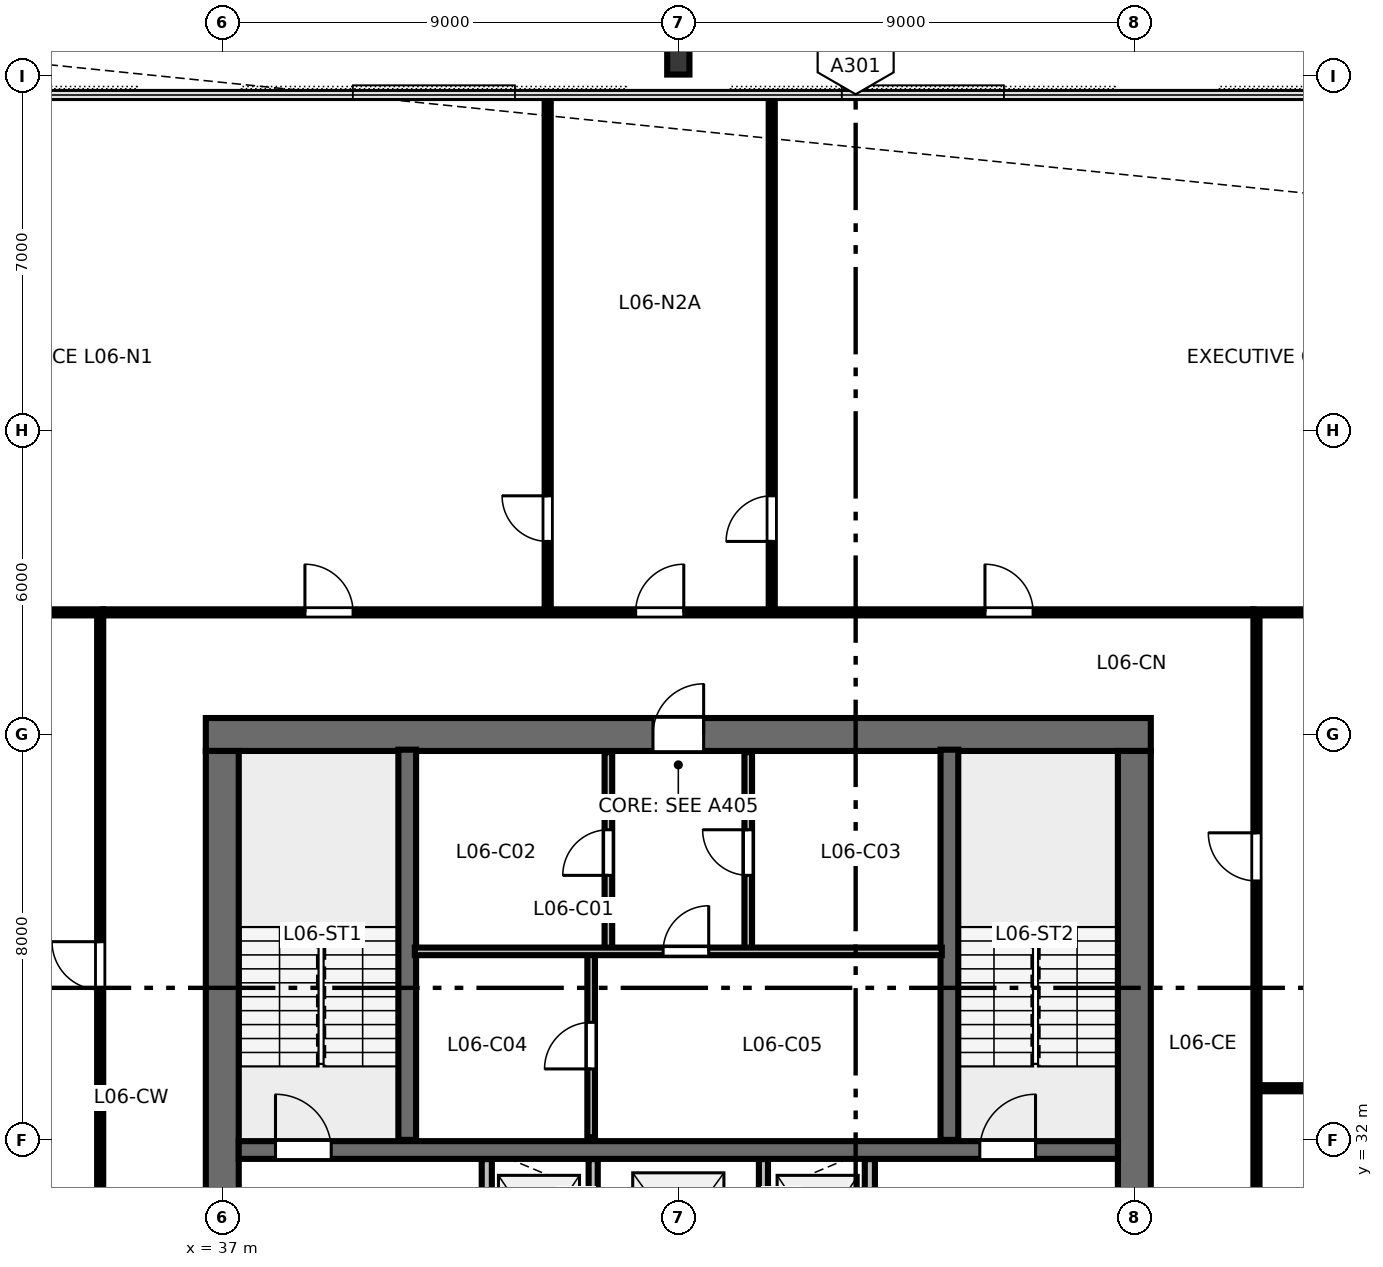
"""IFC4 building model, lengths in metres.
Left out: names, types, materials, properties, quantities, classifications, styles, units other than length and angle.
Written with IfcOpenShell. Run it as: python <this file> out.ifc"""

import sys

from ifc_helpers import new_model, si_unit, direction, frame, frame_2d, origin, origin_2d, place, context, subcontext, project, spatial, rectangle, i_section, extrude, element, fill, save


model = new_model("IFC4")
c1 = context("Model", 3, precision=1e-05, world=origin(), true_north=direction((0.0, 1.0)))
c2 = subcontext(c1, "Body", "Model", "MODEL_VIEW")
j1 = project(units=[si_unit("LENGTHUNIT", "METRE"), si_unit("PLANEANGLEUNIT", "RADIAN")], contexts=[c1])
p1 = place(None, origin())
s1 = spatial("IfcSite", under=j1, at=p1, CompositionType="ELEMENT")
p2 = place(p1, origin())
s2 = spatial("IfcBuilding", under=s1, at=p2, CompositionType="ELEMENT")
p3 = place(p2, frame((0.0, 0.0, 28.0)))
s3 = spatial("IfcBuildingStorey", under=s2, at=p3, CompositionType="ELEMENT", Elevation=28.0)
p4 = place(p3, frame((36.675, 40.0, 0.0), z_axis=(0.0, 0.0, 1.0), x_axis=(1.0, 0.0, 0.0)))
e1 = element("IfcWall", 1, at=p4, inside=s3, PredefinedType="SHEAR", context=c2, shape_type="SweptSolid", body=[
    extrude(rectangle(XDim=18.65, YDim=0.65, at=frame_2d((9.325, 0.0))), origin(), (0.0, 0.0, 1.0), 3.36),
])
p5 = place(p4, frame((8.825, 0.0, 0.0)))
e2 = element("IfcOpeningElement", 2, at=p5, cuts=e1, PredefinedType="OPENING", context=c2, shape_type="SweptSolid", body=[
    extrude(rectangle(XDim=1.0, YDim=2.15, at=frame_2d((0.5, 1.075))), frame((0.0, 0.335, 0.0), z_axis=(0.0, -1.0, 0.0), x_axis=(1.0, 0.0, 0.0)), (0.0, 0.0, 1.0), 0.67),
])
p6 = place(p3, frame((37.0, 24.325, 0.0), z_axis=(0.0, 0.0, 1.0), x_axis=(0.0, 1.0, 0.0)))
e3 = element("IfcWall", 3, at=p6, inside=s3, PredefinedType="SHEAR", context=c2, shape_type="SweptSolid", body=[
    extrude(rectangle(XDim=15.35, YDim=0.65, at=frame_2d((7.675, 0.0))), origin(), (0.0, 0.0, 1.0), 3.36),
])
p7 = place(p6, frame((5.2, 0.0, 0.0)))
e4 = element("IfcOpeningElement", 4, at=p7, cuts=e3, PredefinedType="OPENING", context=c2, shape_type="SweptSolid", body=[
    extrude(rectangle(XDim=1.15, YDim=2.15, at=frame_2d((0.575, 1.075))), frame((0.0, 0.335, 0.0), z_axis=(0.0, -1.0, 0.0), x_axis=(1.0, 0.0, 0.0)), (0.0, 0.0, 1.0), 0.67),
])
p8 = place(p3, frame((55.0, 24.325, 0.0), z_axis=(0.0, 0.0, 1.0), x_axis=(0.0, 1.0, 0.0)))
e5 = element("IfcWall", 5, at=p8, inside=s3, PredefinedType="SHEAR", context=c2, shape_type="SweptSolid", body=[
    extrude(rectangle(XDim=15.35, YDim=0.65, at=frame_2d((7.675, 0.0))), origin(), (0.0, 0.0, 1.0), 3.36),
])
p9 = place(p8, frame((5.2, 0.0, 0.0)))
e6 = element("IfcOpeningElement", 6, at=p9, cuts=e5, PredefinedType="OPENING", context=c2, shape_type="SweptSolid", body=[
    extrude(rectangle(XDim=1.15, YDim=2.15, at=frame_2d((0.575, 1.075))), frame((0.0, 0.335, 0.0), z_axis=(0.0, -1.0, 0.0), x_axis=(1.0, 0.0, 0.0)), (0.0, 0.0, 1.0), 0.67),
])
p10 = place(p3, frame((37.325, 31.8, 0.0), z_axis=(0.0, 0.0, 1.0), x_axis=(1.0, 0.0, 0.0)))
e7 = element("IfcWall", 7, at=p10, inside=s3, PredefinedType="SHEAR", context=c2, shape_type="SweptSolid", body=[
    extrude(rectangle(XDim=17.35, YDim=0.35, at=frame_2d((8.675, 0.0))), origin(), (0.0, 0.0, 1.0), 3.36),
])
p11 = place(p10, frame((0.725, 0.0, 0.0)))
e8 = element("IfcOpeningElement", 8, at=p11, cuts=e7, PredefinedType="OPENING", context=c2, shape_type="SweptSolid", body=[
    extrude(rectangle(XDim=1.1, YDim=2.15, at=frame_2d((0.55, 1.075))), frame((0.0, 0.185, 0.0), z_axis=(0.0, -1.0, 0.0), x_axis=(1.0, 0.0, 0.0)), (0.0, 0.0, 1.0), 0.37),
])
p12 = place(p10, frame((14.625, 0.0, 0.0)))
e9 = element("IfcOpeningElement", 9, at=p12, cuts=e7, PredefinedType="OPENING", context=c2, shape_type="SweptSolid", body=[
    extrude(rectangle(XDim=1.1, YDim=2.15, at=frame_2d((0.55, 1.075))), frame((0.0, 0.185, 0.0), z_axis=(0.0, -1.0, 0.0), x_axis=(1.0, 0.0, 0.0)), (0.0, 0.0, 1.0), 0.37),
])
p13 = place(p3, frame((46.0, 53.28, 0.0), z_axis=(0.0, 0.0, 1.0), x_axis=(1.0, 0.0, 0.0)))
e10 = element("IfcColumn", 10, at=p13, inside=s3, PredefinedType="COLUMN", context=c2, shape_type="SweptSolid", body=[
    extrude(i_section(OverallWidth=0.439, OverallDepth=0.514, WebThickness=0.06, FlangeThickness=0.097, FilletRadius=0.025, at=origin_2d()), origin(), (0.0, 0.0, 1.0), 3.358),
])
for number, where, z_axis, x_axis in (
    (11, (40.65, 32.0, 0.0), (0.0, 0.0, 1.0), (0.0, 1.0, 0.0)),
    (12, (51.35, 32.0, 0.0), (0.0, 0.0, 1.0), (0.0, 1.0, 0.0)),
):
    element("IfcWall", number, at=place(p3, frame(where, z_axis=z_axis, x_axis=x_axis)), inside=s3, PredefinedType="SHEAR", context=c2, shape_type="SweptSolid", body=[
        extrude(rectangle(XDim=7.7, YDim=0.35, at=frame_2d((3.85, 0.0))), origin(), (0.0, 0.0, 1.0), 3.6),
    ])
p14 = place(p3, frame((44.62, 35.72, 0.0), z_axis=(0.0, 0.0, 1.0), x_axis=(0.0, 1.0, 0.0)))
e13 = element("IfcWall", 13, at=p14, inside=s3, PredefinedType="PARTITIONING", context=c2, shape_type="SweptSolid", body=[
    extrude(rectangle(XDim=3.93, YDim=0.15, at=frame_2d((1.965, 0.0))), origin(), (0.0, 0.0, 1.0), 3.36),
])
p15 = place(p14, frame((1.5, 0.0, 0.0)))
e14 = element("IfcOpeningElement", 14, at=p15, cuts=e13, PredefinedType="OPENING", context=c2, shape_type="SweptSolid", body=[
    extrude(rectangle(XDim=0.9, YDim=2.15, at=frame_2d((0.45, 1.075))), frame((0.0, 0.085, 0.0), z_axis=(0.0, -1.0, 0.0), x_axis=(1.0, 0.0, 0.0)), (0.0, 0.0, 1.0), 0.17),
])
p16 = place(p3, frame((47.38, 35.72, 0.0), z_axis=(0.0, 0.0, 1.0), x_axis=(0.0, 1.0, 0.0)))
e15 = element("IfcWall", 15, at=p16, inside=s3, PredefinedType="PARTITIONING", context=c2, shape_type="SweptSolid", body=[
    extrude(rectangle(XDim=3.93, YDim=0.15, at=frame_2d((1.965, 0.0))), origin(), (0.0, 0.0, 1.0), 3.36),
])
p17 = place(p16, frame((1.5, 0.0, 0.0)))
e16 = element("IfcOpeningElement", 16, at=p17, cuts=e15, PredefinedType="OPENING", context=c2, shape_type="SweptSolid", body=[
    extrude(rectangle(XDim=0.9, YDim=2.15, at=frame_2d((0.45, 1.075))), frame((0.0, 0.085, 0.0), z_axis=(0.0, -1.0, 0.0), x_axis=(1.0, 0.0, 0.0)), (0.0, 0.0, 1.0), 0.17),
])
p18 = place(p3, frame((44.28, 32.05, 0.0), z_axis=(0.0, 0.0, 1.0), x_axis=(0.0, 1.0, 0.0)))
e17 = element("IfcWall", 17, at=p18, inside=s3, PredefinedType="PARTITIONING", context=c2, shape_type="SweptSolid", body=[
    extrude(rectangle(XDim=3.67, YDim=0.15, at=frame_2d((1.835, 0.0))), origin(), (0.0, 0.0, 1.0), 3.36),
])
p19 = place(p18, frame((1.35, 0.0, 0.0)))
e18 = element("IfcOpeningElement", 18, at=p19, cuts=e17, PredefinedType="OPENING", context=c2, shape_type="SweptSolid", body=[
    extrude(rectangle(XDim=0.92, YDim=2.15, at=frame_2d((0.46, 1.075))), frame((0.0, 0.085, 0.0), z_axis=(0.0, -1.0, 0.0), x_axis=(1.0, 0.0, 0.0)), (0.0, 0.0, 1.0), 0.17),
])
p20 = place(p3, frame((40.8, 35.72, 0.0), z_axis=(0.0, 0.0, 1.0), x_axis=(1.0, 0.0, 0.0)))
e19 = element("IfcWall", 19, at=p20, inside=s3, PredefinedType="PARTITIONING", context=c2, shape_type="SweptSolid", body=[
    extrude(rectangle(XDim=10.4, YDim=0.15, at=frame_2d((5.2, 0.0))), origin(), (0.0, 0.0, 1.0), 3.36),
])
p21 = place(p20, frame((4.9, 0.0, 0.0)))
e20 = element("IfcOpeningElement", 20, at=p21, cuts=e19, PredefinedType="OPENING", context=c2, shape_type="SweptSolid", body=[
    extrude(rectangle(XDim=0.9, YDim=2.15, at=frame_2d((0.45, 1.075))), frame((0.0, 0.085, 0.0), z_axis=(0.0, -1.0, 0.0), x_axis=(1.0, 0.0, 0.0)), (0.0, 0.0, 1.0), 0.17),
])
p22 = place(p3, frame((42.22, 28.58, 0.0), z_axis=(0.0, 0.0, 1.0), x_axis=(0.0, 1.0, 0.0)))
e21 = element("IfcWall", 21, at=p22, inside=s3, PredefinedType="PARTITIONING", context=c2, shape_type="SweptSolid", body=[
    extrude(rectangle(XDim=3.04, YDim=0.2, at=frame_2d((1.52, 0.0))), origin(), (0.0, 0.0, 1.0), 3.36),
])
p23 = place(p22, frame((0.95, 0.0, 0.0)))
e22 = element("IfcOpeningElement", 22, at=p23, cuts=e21, PredefinedType="OPENING", context=c2, shape_type="SweptSolid", body=[
    extrude(rectangle(XDim=1.05, YDim=2.15, at=frame_2d((0.525, 1.075))), frame((0.0, 0.11, 0.0), z_axis=(0.0, -1.0, 0.0), x_axis=(1.0, 0.0, 0.0)), (0.0, 0.0, 1.0), 0.22),
])
p24 = place(p3, frame((49.78, 28.58, 0.0), z_axis=(0.0, 0.0, 1.0), x_axis=(0.0, 1.0, 0.0)))
e23 = element("IfcWall", 23, at=p24, inside=s3, PredefinedType="PARTITIONING", context=c2, shape_type="SweptSolid", body=[
    extrude(rectangle(XDim=3.04, YDim=0.2, at=frame_2d((1.52, 0.0))), origin(), (0.0, 0.0, 1.0), 3.36),
])
p25 = place(p24, frame((0.95, 0.0, 0.0)))
e24 = element("IfcOpeningElement", 24, at=p25, cuts=e23, PredefinedType="OPENING", context=c2, shape_type="SweptSolid", body=[
    extrude(rectangle(XDim=1.05, YDim=2.15, at=frame_2d((0.525, 1.075))), frame((0.0, 0.11, 0.0), z_axis=(0.0, -1.0, 0.0), x_axis=(1.0, 0.0, 0.0)), (0.0, 0.0, 1.0), 0.22),
])
for number, where, z_axis, x_axis in (
    (25, (44.32, 28.58, 0.0), (0.0, 0.0, 1.0), (0.0, 1.0, 0.0)),
    (26, (47.68, 28.58, 0.0), (0.0, 0.0, 1.0), (0.0, 1.0, 0.0)),
):
    element("IfcWall", number, at=place(p3, frame(where, z_axis=z_axis, x_axis=x_axis)), inside=s3, PredefinedType="PARTITIONING", context=c2, shape_type="SweptSolid", body=[
        extrude(rectangle(XDim=3.04, YDim=0.18, at=frame_2d((1.52, 0.0))), origin(), (0.0, 0.0, 1.0), 3.36),
    ])
p26 = place(p3, frame((43.422, 42.41, 0.0), z_axis=(0.0, 0.0, 1.0), x_axis=(0.0, 1.0, 0.0)))
e27 = element("IfcWall", 27, at=p26, inside=s3, PredefinedType="PARTITIONING", context=c2, shape_type="SweptSolid", body=[
    extrude(rectangle(XDim=10.21, YDim=0.12, at=frame_2d((5.105, 0.0))), origin(), (0.0, 0.0, 1.0), 2.64),
])
p27 = place(p26, frame((1.4, 0.0, 0.0)))
e28 = element("IfcOpeningElement", 28, at=p27, cuts=e27, PredefinedType="OPENING", context=c2, shape_type="SweptSolid", body=[
    extrude(rectangle(XDim=0.9, YDim=2.15, at=frame_2d((0.45, 1.075))), frame((0.0, 0.07, 0.0), z_axis=(0.0, -1.0, 0.0), x_axis=(1.0, 0.0, 0.0)), (0.0, 0.0, 1.0), 0.14),
])
p28 = place(p3, frame((47.844, 42.41, 0.0), z_axis=(0.0, 0.0, 1.0), x_axis=(0.0, 1.0, 0.0)))
e29 = element("IfcWall", 29, at=p28, inside=s3, PredefinedType="PARTITIONING", context=c2, shape_type="SweptSolid", body=[
    extrude(rectangle(XDim=10.21, YDim=0.12, at=frame_2d((5.105, 0.0))), origin(), (0.0, 0.0, 1.0), 2.64),
])
p29 = place(p28, frame((1.4, 0.0, 0.0)))
e30 = element("IfcOpeningElement", 30, at=p29, cuts=e29, PredefinedType="OPENING", context=c2, shape_type="SweptSolid", body=[
    extrude(rectangle(XDim=0.9, YDim=2.15, at=frame_2d((0.45, 1.075))), frame((0.0, 0.07, 0.0), z_axis=(0.0, -1.0, 0.0), x_axis=(1.0, 0.0, 0.0)), (0.0, 0.0, 1.0), 0.14),
])
p30 = place(p3, frame((34.65, 42.41, 0.0), z_axis=(0.0, 0.0, 1.0), x_axis=(1.0, 0.0, 0.0)))
e31 = element("IfcWall", 31, at=p30, inside=s3, PredefinedType="PARTITIONING", context=c2, shape_type="SweptSolid", body=[
    extrude(rectangle(XDim=22.7, YDim=0.12, at=frame_2d((11.35, 0.0))), origin(), (0.0, 0.0, 1.0), 2.64),
])
p31 = place(p30, frame((3.981, 0.0, 0.0)))
e32 = element("IfcOpeningElement", 32, at=p31, cuts=e31, PredefinedType="OPENING", context=c2, shape_type="SweptSolid", body=[
    extrude(rectangle(XDim=0.95, YDim=2.15, at=frame_2d((0.475, 1.075))), frame((0.0, 0.07, 0.0), z_axis=(0.0, -1.0, 0.0), x_axis=(1.0, 0.0, 0.0)), (0.0, 0.0, 1.0), 0.14),
])
p32 = place(p30, frame((10.508, 0.0, 0.0)))
e33 = element("IfcOpeningElement", 33, at=p32, cuts=e31, PredefinedType="OPENING", context=c2, shape_type="SweptSolid", body=[
    extrude(rectangle(XDim=0.95, YDim=2.15, at=frame_2d((0.475, 1.075))), frame((0.0, 0.07, 0.0), z_axis=(0.0, -1.0, 0.0), x_axis=(1.0, 0.0, 0.0)), (0.0, 0.0, 1.0), 0.14),
])
p33 = place(p30, frame((17.402, 0.0, 0.0)))
e34 = element("IfcOpeningElement", 34, at=p33, cuts=e31, PredefinedType="OPENING", context=c2, shape_type="SweptSolid", body=[
    extrude(rectangle(XDim=0.95, YDim=2.15, at=frame_2d((0.475, 1.075))), frame((0.0, 0.07, 0.0), z_axis=(0.0, -1.0, 0.0), x_axis=(1.0, 0.0, 0.0)), (0.0, 0.0, 1.0), 0.14),
])
p34 = place(p3, frame((34.59, 21.65, 0.0), z_axis=(0.0, 0.0, 1.0), x_axis=(0.0, 1.0, 0.0)))
e35 = element("IfcWall", 35, at=p34, inside=s3, PredefinedType="PARTITIONING", context=c2, shape_type="SweptSolid", body=[
    extrude(rectangle(XDim=20.7, YDim=0.12, at=frame_2d((10.35, 0.0))), origin(), (0.0, 0.0, 1.0), 2.64),
])
p35 = place(p34, frame((3.161, 0.0, 0.0)))
e36 = element("IfcOpeningElement", 36, at=p35, cuts=e35, PredefinedType="OPENING", context=c2, shape_type="SweptSolid", body=[
    extrude(rectangle(XDim=0.95, YDim=2.15, at=frame_2d((0.475, 1.075))), frame((0.0, 0.07, 0.0), z_axis=(0.0, -1.0, 0.0), x_axis=(1.0, 0.0, 0.0)), (0.0, 0.0, 1.0), 0.14),
])
p36 = place(p34, frame((13.311, 0.0, 0.0)))
e37 = element("IfcOpeningElement", 37, at=p36, cuts=e35, PredefinedType="OPENING", context=c2, shape_type="SweptSolid", body=[
    extrude(rectangle(XDim=0.95, YDim=2.15, at=frame_2d((0.475, 1.075))), frame((0.0, 0.07, 0.0), z_axis=(0.0, -1.0, 0.0), x_axis=(1.0, 0.0, 0.0)), (0.0, 0.0, 1.0), 0.14),
])
p37 = place(p3, frame((57.41, 33.019, 0.0), z_axis=(0.0, 0.0, 1.0), x_axis=(1.0, 0.0, 0.0)))
e38 = element("IfcWall", 38, at=p37, inside=s3, PredefinedType="PARTITIONING", context=c2, shape_type="SweptSolid", body=[
    extrude(rectangle(XDim=12.01, YDim=0.12, at=frame_2d((6.005, 0.0))), origin(), (0.0, 0.0, 1.0), 2.64),
])
p38 = place(p37, frame((1.4, 0.0, 0.0)))
e39 = element("IfcOpeningElement", 39, at=p38, cuts=e38, PredefinedType="OPENING", context=c2, shape_type="SweptSolid", body=[
    extrude(rectangle(XDim=0.9, YDim=2.15, at=frame_2d((0.45, 1.075))), frame((0.0, 0.07, 0.0), z_axis=(0.0, -1.0, 0.0), x_axis=(1.0, 0.0, 0.0)), (0.0, 0.0, 1.0), 0.14),
])
p39 = place(p3, frame((57.41, 21.65, 0.0), z_axis=(0.0, 0.0, 1.0), x_axis=(0.0, 1.0, 0.0)))
e40 = element("IfcWall", 40, at=p39, inside=s3, PredefinedType="PARTITIONING", context=c2, shape_type="SweptSolid", body=[
    extrude(rectangle(XDim=20.7, YDim=0.12, at=frame_2d((10.35, 0.0))), origin(), (0.0, 0.0, 1.0), 2.64),
])
p40 = place(p39, frame((5.31, 0.0, 0.0)))
e41 = element("IfcOpeningElement", 41, at=p40, cuts=e40, PredefinedType="OPENING", context=c2, shape_type="SweptSolid", body=[
    extrude(rectangle(XDim=0.95, YDim=2.15, at=frame_2d((0.475, 1.075))), frame((0.0, 0.07, 0.0), z_axis=(0.0, -1.0, 0.0), x_axis=(1.0, 0.0, 0.0)), (0.0, 0.0, 1.0), 0.14),
])
p41 = place(p39, frame((15.459, 0.0, 0.0)))
e42 = element("IfcOpeningElement", 42, at=p41, cuts=e40, PredefinedType="OPENING", context=c2, shape_type="SweptSolid", body=[
    extrude(rectangle(XDim=0.95, YDim=2.15, at=frame_2d((0.475, 1.075))), frame((0.0, 0.07, 0.0), z_axis=(0.0, -1.0, 0.0), x_axis=(1.0, 0.0, 0.0)), (0.0, 0.0, 1.0), 0.14),
])
for number, where, z_axis, x_axis in (
    (43, (34.65, 42.41, 0.0), (0.0, 0.0, 1.0), (-1.0, 0.0, 0.0)),
    (44, (57.35, 42.41, 0.0), (0.0, 0.0, 1.0), (1.0, 0.0, 0.0)),
):
    element("IfcWall", number, at=place(p3, frame(where, z_axis=z_axis, x_axis=x_axis)), inside=s3, PredefinedType="PARTITIONING", context=c2, shape_type="SweptSolid", body=[
        extrude(rectangle(XDim=12.07, YDim=0.12, at=frame_2d((6.035, 0.0))), origin(), (0.0, 0.0, 1.0), 2.64),
    ])
p42 = place(p11, origin())
e45 = element("IfcDoor", 45, at=p42, inside=s3, OperationType="SINGLE_SWING_LEFT", PredefinedType="DOOR", context=c2, shape_type="SweptSolid", body=[
    extrude(rectangle(XDim=1.1, YDim=2.15, at=frame_2d((0.55, 1.075))), frame((0.0, 0.025, 0.0), z_axis=(0.0, -1.0, 0.0), x_axis=(1.0, 0.0, 0.0)), (0.0, 0.0, 1.0), 0.05),
])
fill(e8, e45)
p43 = place(p12, origin())
e46 = element("IfcDoor", 46, at=p43, inside=s3, OperationType="SINGLE_SWING_RIGHT", PredefinedType="DOOR", context=c2, shape_type="SweptSolid", body=[
    extrude(rectangle(XDim=1.1, YDim=2.15, at=frame_2d((0.55, 1.075))), frame((0.0, 0.025, 0.0), z_axis=(0.0, -1.0, 0.0), x_axis=(1.0, 0.0, 0.0)), (0.0, 0.0, 1.0), 0.05),
])
fill(e9, e46)
p44 = place(p5, origin())
e47 = element("IfcDoor", 47, at=p44, inside=s3, OperationType="SINGLE_SWING_RIGHT", PredefinedType="DOOR", context=c2, shape_type="SweptSolid", body=[
    extrude(rectangle(XDim=1.0, YDim=2.15, at=frame_2d((0.5, 1.075))), frame((0.0, 0.025, 0.0), z_axis=(0.0, -1.0, 0.0), x_axis=(1.0, 0.0, 0.0)), (0.0, 0.0, 1.0), 0.05),
])
fill(e2, e47)
p45 = place(p15, origin())
e48 = element("IfcDoor", 48, at=p45, inside=s3, OperationType="SINGLE_SWING_LEFT", PredefinedType="DOOR", context=c2, shape_type="SweptSolid", body=[
    extrude(rectangle(XDim=0.9, YDim=2.15, at=frame_2d((0.45, 1.075))), frame((0.0, 0.025, 0.0), z_axis=(0.0, -1.0, 0.0), x_axis=(1.0, 0.0, 0.0)), (0.0, 0.0, 1.0), 0.05),
])
fill(e14, e48)
p46 = place(p17, origin())
e49 = element("IfcDoor", 49, at=p46, inside=s3, OperationType="SINGLE_SWING_RIGHT", PredefinedType="DOOR", context=c2, shape_type="SweptSolid", body=[
    extrude(rectangle(XDim=0.9, YDim=2.15, at=frame_2d((0.45, 1.075))), frame((0.0, 0.025, 0.0), z_axis=(0.0, -1.0, 0.0), x_axis=(1.0, 0.0, 0.0)), (0.0, 0.0, 1.0), 0.05),
])
fill(e16, e49)
p47 = place(p19, origin())
e50 = element("IfcDoor", 50, at=p47, inside=s3, OperationType="SINGLE_SWING_LEFT", PredefinedType="DOOR", context=c2, shape_type="SweptSolid", body=[
    extrude(rectangle(XDim=0.92, YDim=2.15, at=frame_2d((0.46, 1.075))), frame((0.0, 0.025, 0.0), z_axis=(0.0, -1.0, 0.0), x_axis=(1.0, 0.0, 0.0)), (0.0, 0.0, 1.0), 0.05),
])
fill(e18, e50)
p48 = place(p21, origin())
e51 = element("IfcDoor", 51, at=p48, inside=s3, OperationType="SINGLE_SWING_RIGHT", PredefinedType="DOOR", context=c2, shape_type="SweptSolid", body=[
    extrude(rectangle(XDim=0.9, YDim=2.15, at=frame_2d((0.45, 1.075))), frame((0.0, 0.025, 0.0), z_axis=(0.0, -1.0, 0.0), x_axis=(1.0, 0.0, 0.0)), (0.0, 0.0, 1.0), 0.05),
])
fill(e20, e51)
p49 = place(p27, origin())
e52 = element("IfcDoor", 52, at=p49, inside=s3, OperationType="SINGLE_SWING_RIGHT", PredefinedType="DOOR", context=c2, shape_type="SweptSolid", body=[
    extrude(rectangle(XDim=0.9, YDim=2.15, at=frame_2d((0.45, 1.075))), frame((0.0, 0.025, 0.0), z_axis=(0.0, -1.0, 0.0), x_axis=(1.0, 0.0, 0.0)), (0.0, 0.0, 1.0), 0.05),
])
fill(e28, e52)
p50 = place(p29, origin())
e53 = element("IfcDoor", 53, at=p50, inside=s3, OperationType="SINGLE_SWING_LEFT", PredefinedType="DOOR", context=c2, shape_type="SweptSolid", body=[
    extrude(rectangle(XDim=0.9, YDim=2.15, at=frame_2d((0.45, 1.075))), frame((0.0, 0.025, 0.0), z_axis=(0.0, -1.0, 0.0), x_axis=(1.0, 0.0, 0.0)), (0.0, 0.0, 1.0), 0.05),
])
fill(e30, e53)
p51 = place(p31, origin())
e54 = element("IfcDoor", 54, at=p51, inside=s3, OperationType="SINGLE_SWING_LEFT", PredefinedType="DOOR", context=c2, shape_type="SweptSolid", body=[
    extrude(rectangle(XDim=0.95, YDim=2.15, at=frame_2d((0.475, 1.075))), frame((0.0, 0.025, 0.0), z_axis=(0.0, -1.0, 0.0), x_axis=(1.0, 0.0, 0.0)), (0.0, 0.0, 1.0), 0.05),
])
fill(e32, e54)
p52 = place(p32, origin())
e55 = element("IfcDoor", 55, at=p52, inside=s3, OperationType="SINGLE_SWING_RIGHT", PredefinedType="DOOR", context=c2, shape_type="SweptSolid", body=[
    extrude(rectangle(XDim=0.95, YDim=2.15, at=frame_2d((0.475, 1.075))), frame((0.0, 0.025, 0.0), z_axis=(0.0, -1.0, 0.0), x_axis=(1.0, 0.0, 0.0)), (0.0, 0.0, 1.0), 0.05),
])
fill(e33, e55)
p53 = place(p33, origin())
e56 = element("IfcDoor", 56, at=p53, inside=s3, OperationType="SINGLE_SWING_LEFT", PredefinedType="DOOR", context=c2, shape_type="SweptSolid", body=[
    extrude(rectangle(XDim=0.95, YDim=2.15, at=frame_2d((0.475, 1.075))), frame((0.0, 0.025, 0.0), z_axis=(0.0, -1.0, 0.0), x_axis=(1.0, 0.0, 0.0)), (0.0, 0.0, 1.0), 0.05),
])
fill(e34, e56)
p54 = place(p36, origin())
e57 = element("IfcDoor", 57, at=p54, inside=s3, OperationType="SINGLE_SWING_RIGHT", PredefinedType="DOOR", context=c2, shape_type="SweptSolid", body=[
    extrude(rectangle(XDim=0.95, YDim=2.15, at=frame_2d((0.475, 1.075))), frame((0.0, 0.025, 0.0), z_axis=(0.0, -1.0, 0.0), x_axis=(1.0, 0.0, 0.0)), (0.0, 0.0, 1.0), 0.05),
])
fill(e37, e57)
p55 = place(p41, origin())
e58 = element("IfcDoor", 58, at=p55, inside=s3, OperationType="SINGLE_SWING_RIGHT", PredefinedType="DOOR", context=c2, shape_type="SweptSolid", body=[
    extrude(rectangle(XDim=0.95, YDim=2.15, at=frame_2d((0.475, 1.075))), frame((0.0, 0.025, 0.0), z_axis=(0.0, -1.0, 0.0), x_axis=(1.0, 0.0, 0.0)), (0.0, 0.0, 1.0), 0.05),
])
fill(e42, e58)
save(model, sys.argv[1])
